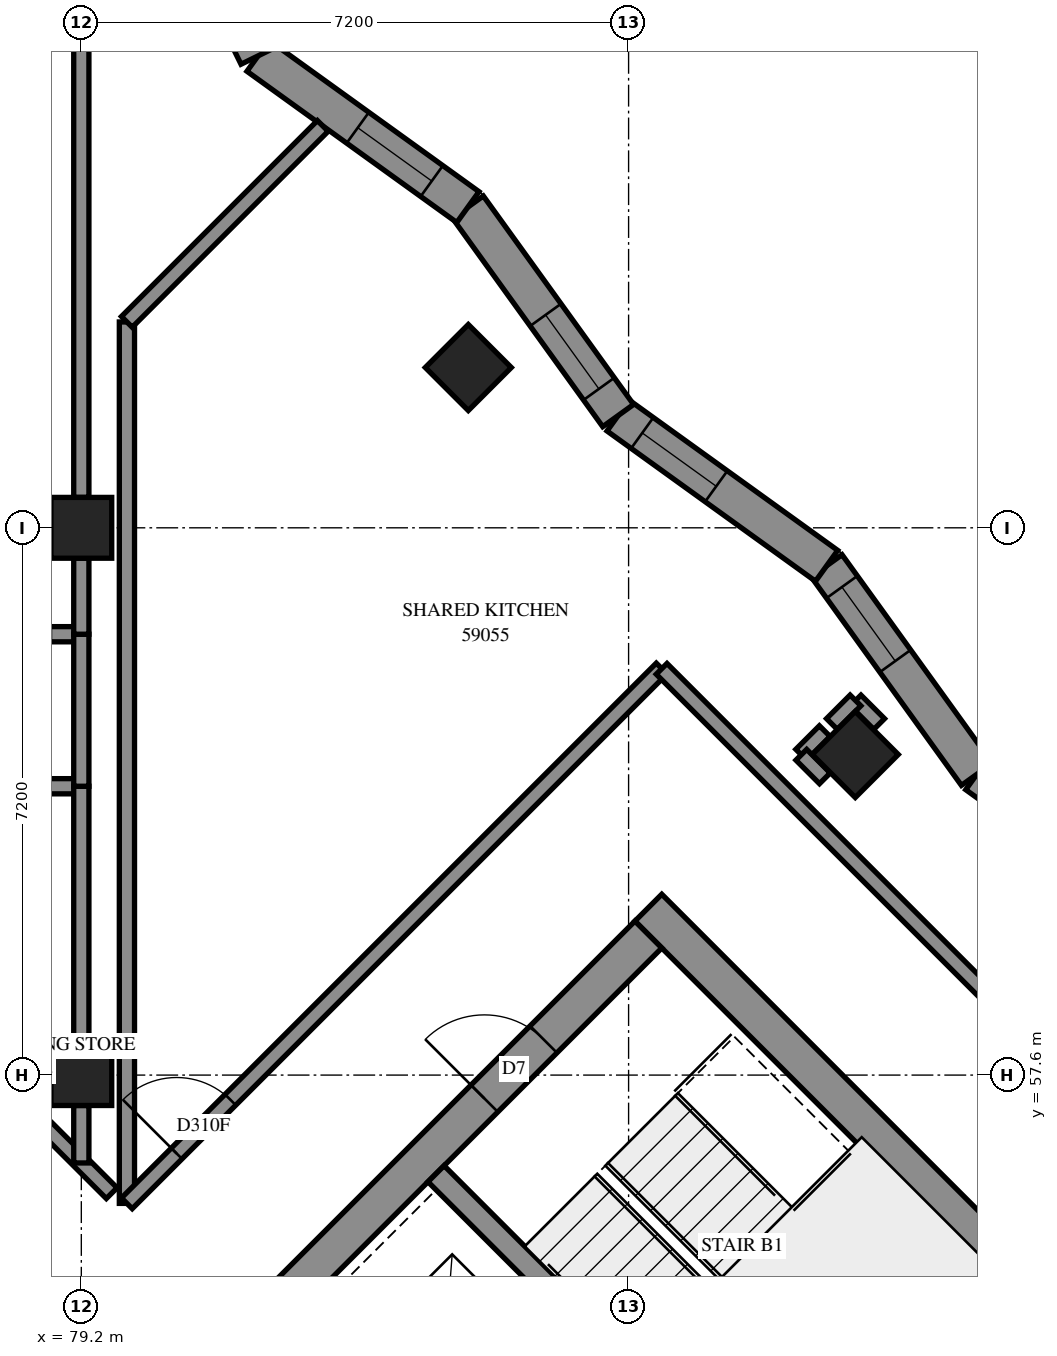
"""IFC4 building model, lengths in metres.
Left out: names, types, materials, properties, quantities, classifications, styles, units other than length and angle.
Written with IfcOpenShell. Run it as: python <this file> out.ifc"""

import sys

from ifc_helpers import new_model, si_unit, direction, frame, frame_2d, origin, origin_2d, place, context, subcontext, project, spatial, polyline, rectangle, outline, extrude, element, fill, save


model = new_model("IFC4")
c1 = context("Model", 3, precision=1e-05, world=origin(), true_north=direction((0.0, 1.0)))
c2 = subcontext(c1, "Body", "Model", "MODEL_VIEW")
j1 = project(units=[si_unit("LENGTHUNIT", "METRE"), si_unit("PLANEANGLEUNIT", "RADIAN")], contexts=[c1])
p1 = place(None, origin())
s1 = spatial("IfcSite", under=j1, at=p1, CompositionType="ELEMENT")
p2 = place(p1, origin())
s2 = spatial("IfcBuilding", under=s1, at=p2, CompositionType="ELEMENT")
p3 = place(p2, frame((0.0, 0.0, 216.8)))
s3 = spatial("IfcBuildingStorey", under=s2, at=p3, CompositionType="ELEMENT", Elevation=216.8)
for number, where, z_axis, x_axis in (
    (1, (79.2, 57.6, 0.0), (0.0, 0.0, 1.0), (1.0, 0.0, 0.0)),
    (2, (79.2, 64.8, 0.0), (0.0, 0.0, 1.0), (1.0, 0.0, 0.0)),
    (3, (84.291, 66.909, 0.0), (0.0, 0.0, 1.0), (0.707, -0.707, 0.0)),
    (4, (89.382, 61.818, 0.0), (0.0, 0.0, 1.0), (0.707, -0.707, 0.0)),
):
    element("IfcColumn", number, at=place(p3, frame(where, z_axis=z_axis, x_axis=x_axis)), inside=s3, PredefinedType="COLUMN", context=c2, shape_type="SweptSolid", body=[
        extrude(rectangle(XDim=0.8, YDim=0.8, at=origin_2d()), origin(), (0.0, 0.0, 1.0), 3.1),
    ])
p4 = place(p3, frame((86.66, 59.802, -0.3), z_axis=(0.0, 0.0, 1.0), x_axis=(0.7071067812, -0.7071067812, 0.0)))
e5 = element("IfcWall", 5, at=p4, inside=s3, PredefinedType="SHEAR", context=c2, shape_type="SweptSolid", body=[
    extrude(rectangle(XDim=15.4, YDim=0.5, at=frame_2d((7.7, 0.0))), origin(), (0.0, 0.0, 1.0), 2.7),
])
p5 = place(p4, frame((10.5, 0.0, 0.3)))
e6 = element("IfcOpeningElement", 6, at=p5, cuts=e5, PredefinedType="OPENING", context=c2, shape_type="SweptSolid", body=[
    extrude(rectangle(XDim=0.8, YDim=2.1, at=frame_2d((0.4, 1.05))), frame((0.0, 0.26, 0.0), z_axis=(0.0, -1.0, 0.0), x_axis=(1.0, 0.0, 0.0)), (0.0, 0.0, 1.0), 0.52),
])
p6 = place(p3, frame((76.478, 49.267, -0.3), z_axis=(0.0, 0.0, 1.0), x_axis=(0.7071067812, 0.7071067812, 0.0)))
e7 = element("IfcWall", 7, at=p6, inside=s3, PredefinedType="SHEAR", context=c2, shape_type="SweptSolid", body=[
    extrude(rectangle(XDim=14.4, YDim=0.5, at=frame_2d((7.2, 0.0))), origin(), (0.0, 0.0, 1.0), 2.7),
])
p7 = place(p6, frame((4.55, 0.0, 0.3)))
e8 = element("IfcOpeningElement", 8, at=p7, cuts=e7, PredefinedType="OPENING", context=c2, shape_type="SweptSolid", body=[
    extrude(rectangle(XDim=1.1, YDim=2.1, at=frame_2d((0.55, 1.05))), frame((0.0, 0.26, 0.0), z_axis=(0.0, -1.0, 0.0), x_axis=(1.0, 0.0, 0.0)), (0.0, 0.0, 1.0), 0.52),
])
p8 = place(p6, frame((11.35, 0.0, 0.3)))
e9 = element("IfcOpeningElement", 9, at=p8, cuts=e7, PredefinedType="OPENING", context=c2, shape_type="SweptSolid", body=[
    extrude(rectangle(XDim=1.1, YDim=2.1, at=frame_2d((0.55, 1.05))), frame((0.0, 0.26, 0.0), z_axis=(0.0, -1.0, 0.0), x_axis=(1.0, 0.0, 0.0)), (0.0, 0.0, 1.0), 0.52),
])
p9 = place(p3, frame((83.867, 56.302, 0.0), z_axis=(0.0, 0.0, 1.0), x_axis=(0.7071137256, -0.7070998367, 0.0)))
e10 = element("IfcWall", 10, at=p9, inside=s3, PredefinedType="SOLIDWALL", context=c2, shape_type="SweptSolid", body=[
    extrude(rectangle(XDim=7.2, YDim=0.3, at=frame_2d((3.6, 0.0))), origin(), (0.0, 0.0, 1.0), 3.1),
])
p10 = place(p3, frame((93.725, 59.581, 0.0), z_axis=(0.0, 0.0, 1.0), x_axis=(-0.8113222169, 0.5845992306, 0.0)))
e11 = element("IfcWall", 11, at=p10, inside=s3, PredefinedType="SOLIDWALL", context=c2, shape_type="SweptSolid", body=[
    extrude(outline(polyline([(-0.041, -0.25), (3.34, -0.25), (3.421, 0.25), (0.041, 0.25), (-0.041, -0.25)])), origin(), (0.0, 0.0, 1.0), 3.1),
])
p11 = place(p10, frame((1.523, 0.0, 0.45)))
e12 = element("IfcOpeningElement", 12, at=p11, cuts=e11, PredefinedType="OPENING", context=c2, shape_type="SweptSolid", body=[
    extrude(rectangle(XDim=1.2, YDim=2.5, at=frame_2d((0.6, 1.25))), frame((0.0, 0.26, 0.0), z_axis=(0.0, -1.0, 0.0), x_axis=(1.0, 0.0, 0.0)), (0.0, 0.0, 1.0), 0.52),
])
p12 = place(p3, frame((90.982, 61.557, 0.0), z_axis=(0.0, 0.0, 1.0), x_axis=(-0.5845992306, 0.8113222169, 0.0)))
e13 = element("IfcWall", 13, at=p12, inside=s3, PredefinedType="SOLIDWALL", context=c2, shape_type="SweptSolid", body=[
    extrude(outline(polyline([(0.041, -0.25), (3.421, -0.25), (3.34, 0.25), (-0.041, 0.25), (0.041, -0.25)])), origin(), (0.0, 0.0, 1.0), 3.1),
])
p13 = place(p12, frame((1.836, 0.0, 0.45)))
e14 = element("IfcOpeningElement", 14, at=p13, cuts=e13, PredefinedType="OPENING", context=c2, shape_type="SweptSolid", body=[
    extrude(rectangle(XDim=1.2, YDim=2.5, at=frame_2d((0.6, 1.25))), frame((0.0, 0.26, 0.0), z_axis=(0.0, -1.0, 0.0), x_axis=(1.0, 0.0, 0.0)), (0.0, 0.0, 1.0), 0.52),
])
p14 = place(p3, frame((89.005, 64.3, 0.0), z_axis=(0.0, 0.0, 1.0), x_axis=(-0.8113261375, 0.5845937894, 0.0)))
e15 = element("IfcWall", 15, at=p14, inside=s3, PredefinedType="SOLIDWALL", context=c2, shape_type="SweptSolid", body=[
    extrude(outline(polyline([(-0.041, -0.25), (3.34, -0.25), (3.421, 0.25), (0.041, 0.25), (-0.041, -0.25)])), origin(), (0.0, 0.0, 1.0), 3.1),
])
p15 = place(p14, frame((1.79, 0.0, 0.45)))
e16 = element("IfcOpeningElement", 16, at=p15, cuts=e15, PredefinedType="OPENING", context=c2, shape_type="SweptSolid", body=[
    extrude(rectangle(XDim=1.2, YDim=2.5, at=frame_2d((0.6, 1.25))), frame((0.0, 0.26, 0.0), z_axis=(0.0, -1.0, 0.0), x_axis=(1.0, 0.0, 0.0)), (0.0, 0.0, 1.0), 0.52),
])
p16 = place(p3, frame((86.262, 66.276, 0.0), z_axis=(0.0, 0.0, 1.0), x_axis=(-0.5845992306, 0.8113222169, 0.0)))
e17 = element("IfcWall", 17, at=p16, inside=s3, PredefinedType="SOLIDWALL", context=c2, shape_type="SweptSolid", body=[
    extrude(outline(polyline([(0.041, -0.25), (3.421, -0.25), (3.34, 0.25), (-0.041, 0.25), (0.041, -0.25)])), origin(), (0.0, 0.0, 1.0), 3.1),
])
p17 = place(p16, frame((0.432, 0.0, 0.45)))
e18 = element("IfcOpeningElement", 18, at=p17, cuts=e17, PredefinedType="OPENING", context=c2, shape_type="SweptSolid", body=[
    extrude(rectangle(XDim=1.2, YDim=2.5, at=frame_2d((0.6, 1.25))), frame((0.0, 0.26, 0.0), z_axis=(0.0, -1.0, 0.0), x_axis=(1.0, 0.0, 0.0)), (0.0, 0.0, 1.0), 0.52),
])
p18 = place(p3, frame((84.286, 69.019, 0.0), z_axis=(0.0, 0.0, 1.0), x_axis=(-0.8113258148, 0.5845942373, 0.0)))
e19 = element("IfcWall", 19, at=p18, inside=s3, PredefinedType="SOLIDWALL", context=c2, shape_type="SweptSolid", body=[
    extrude(outline(polyline([(-0.041, -0.25), (3.34, -0.25), (3.465, 0.25), (0.041, 0.25), (-0.041, -0.25)])), origin(), (0.0, 0.0, 1.0), 3.1),
])
p19 = place(p18, frame((0.586, 0.0, 0.45)))
e20 = element("IfcOpeningElement", 20, at=p19, cuts=e19, PredefinedType="OPENING", context=c2, shape_type="SweptSolid", body=[
    extrude(rectangle(XDim=1.2, YDim=2.5, at=frame_2d((0.6, 1.25))), frame((0.0, 0.26, 0.0), z_axis=(0.0, -1.0, 0.0), x_axis=(1.0, 0.0, 0.0)), (0.0, 0.0, 1.0), 0.52),
])
p20 = place(p3, frame((81.525, 71.009, 0.0), z_axis=(0.0, 0.0, 1.0), x_axis=(-0.4400711052, 0.8979629293, 0.0)))
e21 = element("IfcWall", 21, at=p20, inside=s3, PredefinedType="SOLIDWALL", context=c2, shape_type="SweptSolid", body=[
    extrude(outline(polyline([(0.063, -0.25), (3.59, -0.25), (3.167, 0.25), (-0.063, 0.25), (0.063, -0.25)])), origin(), (0.0, 0.0, 1.0), 3.1),
])
p21 = place(p20, frame((0.739, 0.0, 0.45)))
e22 = element("IfcOpeningElement", 22, at=p21, cuts=e21, PredefinedType="OPENING", context=c2, shape_type="SweptSolid", body=[
    extrude(rectangle(XDim=1.2, YDim=2.5, at=frame_2d((0.6, 1.25))), frame((0.0, 0.26, 0.0), z_axis=(0.0, -1.0, 0.0), x_axis=(1.0, 0.0, 0.0)), (0.0, 0.0, 1.0), 0.52),
])
p22 = place(p3, frame((79.8, 55.912, 0.0), z_axis=(0.0, 0.0, 1.0), x_axis=(0.0, 1.0, 0.0)))
e23 = element("IfcWall", 23, at=p22, inside=s3, PredefinedType="PARTITIONING", context=c2, shape_type="SweptSolid", body=[
    extrude(rectangle(XDim=11.596, YDim=0.2, at=frame_2d((5.798, 0.0))), origin(), (0.0, 0.0, 1.0), 3.1),
])
p23 = place(p3, frame((79.799, 55.913, 0.0), z_axis=(0.0, 0.0, 1.0), x_axis=(0.7071067812, 0.7071067812, 0.0)))
e24 = element("IfcWall", 24, at=p23, inside=s3, PredefinedType="PARTITIONING", context=c2, shape_type="SweptSolid", body=[
    extrude(rectangle(XDim=9.95, YDim=0.2, at=frame_2d((4.975, 0.0))), origin(), (0.0, 0.0, 1.0), 3.1),
])
p24 = place(p23, frame((0.927, 0.0, 0.0)))
e25 = element("IfcOpeningElement", 25, at=p24, cuts=e24, PredefinedType="OPENING", context=c2, shape_type="SweptSolid", body=[
    extrude(rectangle(XDim=1.0, YDim=2.1, at=frame_2d((0.5, 1.05))), frame((0.0, 0.11, 0.0), z_axis=(0.0, -1.0, 0.0), x_axis=(1.0, 0.0, 0.0)), (0.0, 0.0, 1.0), 0.22),
])
p25 = place(p3, frame((86.835, 62.945, 0.0), z_axis=(0.0, 0.0, 1.0), x_axis=(0.7071067812, -0.7071067812, 0.0)))
e26 = element("IfcWall", 26, at=p25, inside=s3, PredefinedType="PARTITIONING", context=c2, shape_type="SweptSolid", body=[
    extrude(rectangle(XDim=9.798, YDim=0.2, at=frame_2d((4.899, 0.0))), origin(), (0.0, 0.0, 1.0), 3.1),
])
p26 = place(p3, frame((79.2, 65.2, 0.0), z_axis=(0.0, 0.0, 1.0), x_axis=(0.0, 1.0, 0.0)))
e27 = element("IfcWall", 27, at=p26, inside=s3, PredefinedType="PARTITIONING", context=c2, shape_type="SweptSolid", body=[
    extrude(rectangle(XDim=6.4, YDim=0.2, at=frame_2d((3.2, 0.0))), origin(), (0.0, 0.0, 1.0), 3.1),
])
p27 = place(p3, frame((74.246, 61.4, 0.0), z_axis=(0.0, 0.0, 1.0), x_axis=(1.0, 0.0, 0.0)))
e28 = element("IfcWall", 28, at=p27, inside=s3, PredefinedType="PARTITIONING", context=c2, shape_type="SweptSolid", body=[
    extrude(rectangle(XDim=4.954, YDim=0.2, at=frame_2d((2.477, 0.0))), origin(), (0.0, 0.0, 1.0), 3.1),
])
p28 = place(p27, frame((1.17, 0.0, 0.0)))
e29 = element("IfcOpeningElement", 29, at=p28, cuts=e28, PredefinedType="OPENING", context=c2, shape_type="SweptSolid", body=[
    extrude(rectangle(XDim=1.0, YDim=2.1, at=frame_2d((0.5, 1.05))), frame((0.0, 0.11, 0.0), z_axis=(0.0, -1.0, 0.0), x_axis=(1.0, 0.0, 0.0)), (0.0, 0.0, 1.0), 0.22),
])
p29 = place(p3, frame((74.602, 63.4, 0.0), z_axis=(0.0, 0.0, 1.0), x_axis=(1.0, 0.0, 0.0)))
e30 = element("IfcWall", 30, at=p29, inside=s3, PredefinedType="PARTITIONING", context=c2, shape_type="SweptSolid", body=[
    extrude(rectangle(XDim=4.598, YDim=0.2, at=frame_2d((2.299, 0.0))), origin(), (0.0, 0.0, 1.0), 3.1),
])
p30 = place(p29, frame((3.298, 0.0, 0.0)))
e31 = element("IfcOpeningElement", 31, at=p30, cuts=e30, PredefinedType="OPENING", context=c2, shape_type="SweptSolid", body=[
    extrude(rectangle(XDim=0.9, YDim=2.1, at=frame_2d((0.45, 1.05))), frame((0.0, 0.11, 0.0), z_axis=(0.0, -1.0, 0.0), x_axis=(1.0, 0.0, 0.0)), (0.0, 0.0, 1.0), 0.22),
])
p31 = place(p3, frame((76.513, 59.131, 0.0), z_axis=(0.0, 0.0, 1.0), x_axis=(0.7073587997, -0.7068546728, 0.0)))
e32 = element("IfcWall", 32, at=p31, inside=s3, PredefinedType="PARTITIONING", context=c2, shape_type="SweptSolid", body=[
    extrude(rectangle(XDim=4.364, YDim=0.2, at=frame_2d((2.182, 0.0))), origin(), (0.0, 0.0, 1.0), 3.1),
])
p32 = place(p3, frame((79.799, 67.509, 0.0), z_axis=(0.0, 0.0, 1.0), x_axis=(0.707093066, 0.7071204961, 0.0)))
e33 = element("IfcWall", 33, at=p32, inside=s3, PredefinedType="PARTITIONING", context=c2, shape_type="SweptSolid", body=[
    extrude(rectangle(XDim=3.646, YDim=0.2, at=frame_2d((1.823, 0.0))), origin(), (0.0, 0.0, 1.0), 3.1),
])
p33 = place(p3, frame((79.2, 58.0, 0.0), z_axis=(0.0, 0.0, 1.0), x_axis=(0.0, 1.0, 0.0)))
e34 = element("IfcWall", 34, at=p33, inside=s3, PredefinedType="PARTITIONING", context=c2, shape_type="SweptSolid", body=[
    extrude(rectangle(XDim=3.4, YDim=0.2, at=frame_2d((1.7, 0.0))), origin(), (0.0, 0.0, 1.0), 3.1),
])
p34 = place(p3, frame((79.2, 61.4, 0.0), z_axis=(0.0, 0.0, 1.0), x_axis=(0.0, 1.0, 0.0)))
e35 = element("IfcWall", 35, at=p34, inside=s3, PredefinedType="PARTITIONING", context=c2, shape_type="SweptSolid", body=[
    extrude(rectangle(XDim=2.0, YDim=0.2, at=frame_2d((1.0, 0.0))), origin(), (0.0, 0.0, 1.0), 3.1),
])
p35 = place(p3, frame((79.2, 63.4, 0.0), z_axis=(0.0, 0.0, 1.0), x_axis=(0.0, 1.0, 0.0)))
e36 = element("IfcWall", 36, at=p35, inside=s3, PredefinedType="PARTITIONING", context=c2, shape_type="SweptSolid", body=[
    extrude(rectangle(XDim=1.0, YDim=0.2, at=frame_2d((0.5, 0.0))), origin(), (0.0, 0.0, 1.0), 3.1),
])
p36 = place(p3, frame((79.2, 56.444, 0.0), z_axis=(0.0, 0.0, 1.0), x_axis=(0.0, 1.0, 0.0)))
e37 = element("IfcWall", 37, at=p36, inside=s3, PredefinedType="PARTITIONING", context=c2, shape_type="SweptSolid", body=[
    extrude(rectangle(XDim=0.756, YDim=0.2, at=frame_2d((0.378, 0.0))), origin(), (0.0, 0.0, 1.0), 3.1),
])
for number, where, z_axis, x_axis in (
    (38, (88.671, 61.815, 0.0), (0.0, 0.0, 1.0), (0.707, 0.707, 0.0)),
    (39, (88.672, 61.814, 0.0), (0.0, 0.0, 1.0), (0.707, -0.707, 0.0)),
    (40, (89.386, 62.528, 0.0), (0.0, 0.0, 1.0), (0.707, -0.707, 0.0)),
    (41, (89.075, 62.219, 0.0), (0.0, 0.0, 1.0), (0.707, 0.707, 0.0)),
):
    element("IfcWall", number, at=place(p3, frame(where, z_axis=z_axis, x_axis=x_axis)), inside=s3, PredefinedType="PARTITIONING", context=c2, shape_type="SweptSolid", body=[
        extrude(rectangle(XDim=0.438, YDim=0.2, at=frame_2d((0.219, 0.0))), origin(), (0.0, 0.0, 1.0), 3.1),
    ])
p37 = place(p13, origin())
e42 = element("IfcWindow", 42, at=p37, inside=s3, PartitioningType="SINGLE_PANEL", PredefinedType="WINDOW", context=c2, shape_type="SweptSolid", body=[
    extrude(rectangle(XDim=1.2, YDim=2.5, at=frame_2d((0.6, 1.25))), frame((0.0, 0.18, 0.0), z_axis=(0.0, -1.0, 0.0), x_axis=(1.0, 0.0, 0.0)), (0.0, 0.0, 1.0), 0.06),
])
fill(e14, e42)
p38 = place(p15, origin())
e43 = element("IfcWindow", 43, at=p38, inside=s3, PartitioningType="SINGLE_PANEL", PredefinedType="WINDOW", context=c2, shape_type="SweptSolid", body=[
    extrude(rectangle(XDim=1.2, YDim=2.5, at=frame_2d((0.6, 1.25))), frame((0.0, 0.18, 0.0), z_axis=(0.0, -1.0, 0.0), x_axis=(1.0, 0.0, 0.0)), (0.0, 0.0, 1.0), 0.06),
])
fill(e16, e43)
p39 = place(p17, origin())
e44 = element("IfcWindow", 44, at=p39, inside=s3, PartitioningType="SINGLE_PANEL", PredefinedType="WINDOW", context=c2, shape_type="SweptSolid", body=[
    extrude(rectangle(XDim=1.2, YDim=2.5, at=frame_2d((0.6, 1.25))), frame((0.0, 0.18, 0.0), z_axis=(0.0, -1.0, 0.0), x_axis=(1.0, 0.0, 0.0)), (0.0, 0.0, 1.0), 0.06),
])
fill(e18, e44)
p40 = place(p19, origin())
e45 = element("IfcWindow", 45, at=p40, inside=s3, PartitioningType="SINGLE_PANEL", PredefinedType="WINDOW", context=c2, shape_type="SweptSolid", body=[
    extrude(rectangle(XDim=1.2, YDim=2.5, at=frame_2d((0.6, 1.25))), frame((0.0, 0.18, 0.0), z_axis=(0.0, -1.0, 0.0), x_axis=(1.0, 0.0, 0.0)), (0.0, 0.0, 1.0), 0.06),
])
fill(e20, e45)
p41 = place(p8, origin())
e46 = element("IfcDoor", 46, at=p41, inside=s3, OperationType="SINGLE_SWING_LEFT", PredefinedType="DOOR", context=c2, shape_type="SweptSolid", body=[
    extrude(rectangle(XDim=1.1, YDim=2.1, at=frame_2d((0.55, 1.05))), frame((0.0, 0.025, 0.0), z_axis=(0.0, -1.0, 0.0), x_axis=(1.0, 0.0, 0.0)), (0.0, 0.0, 1.0), 0.05),
])
fill(e9, e46)
p42 = place(p24, origin())
e47 = element("IfcDoor", 47, at=p42, inside=s3, OperationType="SINGLE_SWING_RIGHT", PredefinedType="DOOR", context=c2, shape_type="SweptSolid", body=[
    extrude(rectangle(XDim=1.0, YDim=2.1, at=frame_2d((0.5, 1.05))), frame((0.0, 0.025, 0.0), z_axis=(0.0, -1.0, 0.0), x_axis=(1.0, 0.0, 0.0)), (0.0, 0.0, 1.0), 0.05),
])
fill(e25, e47)
save(model, sys.argv[1])
